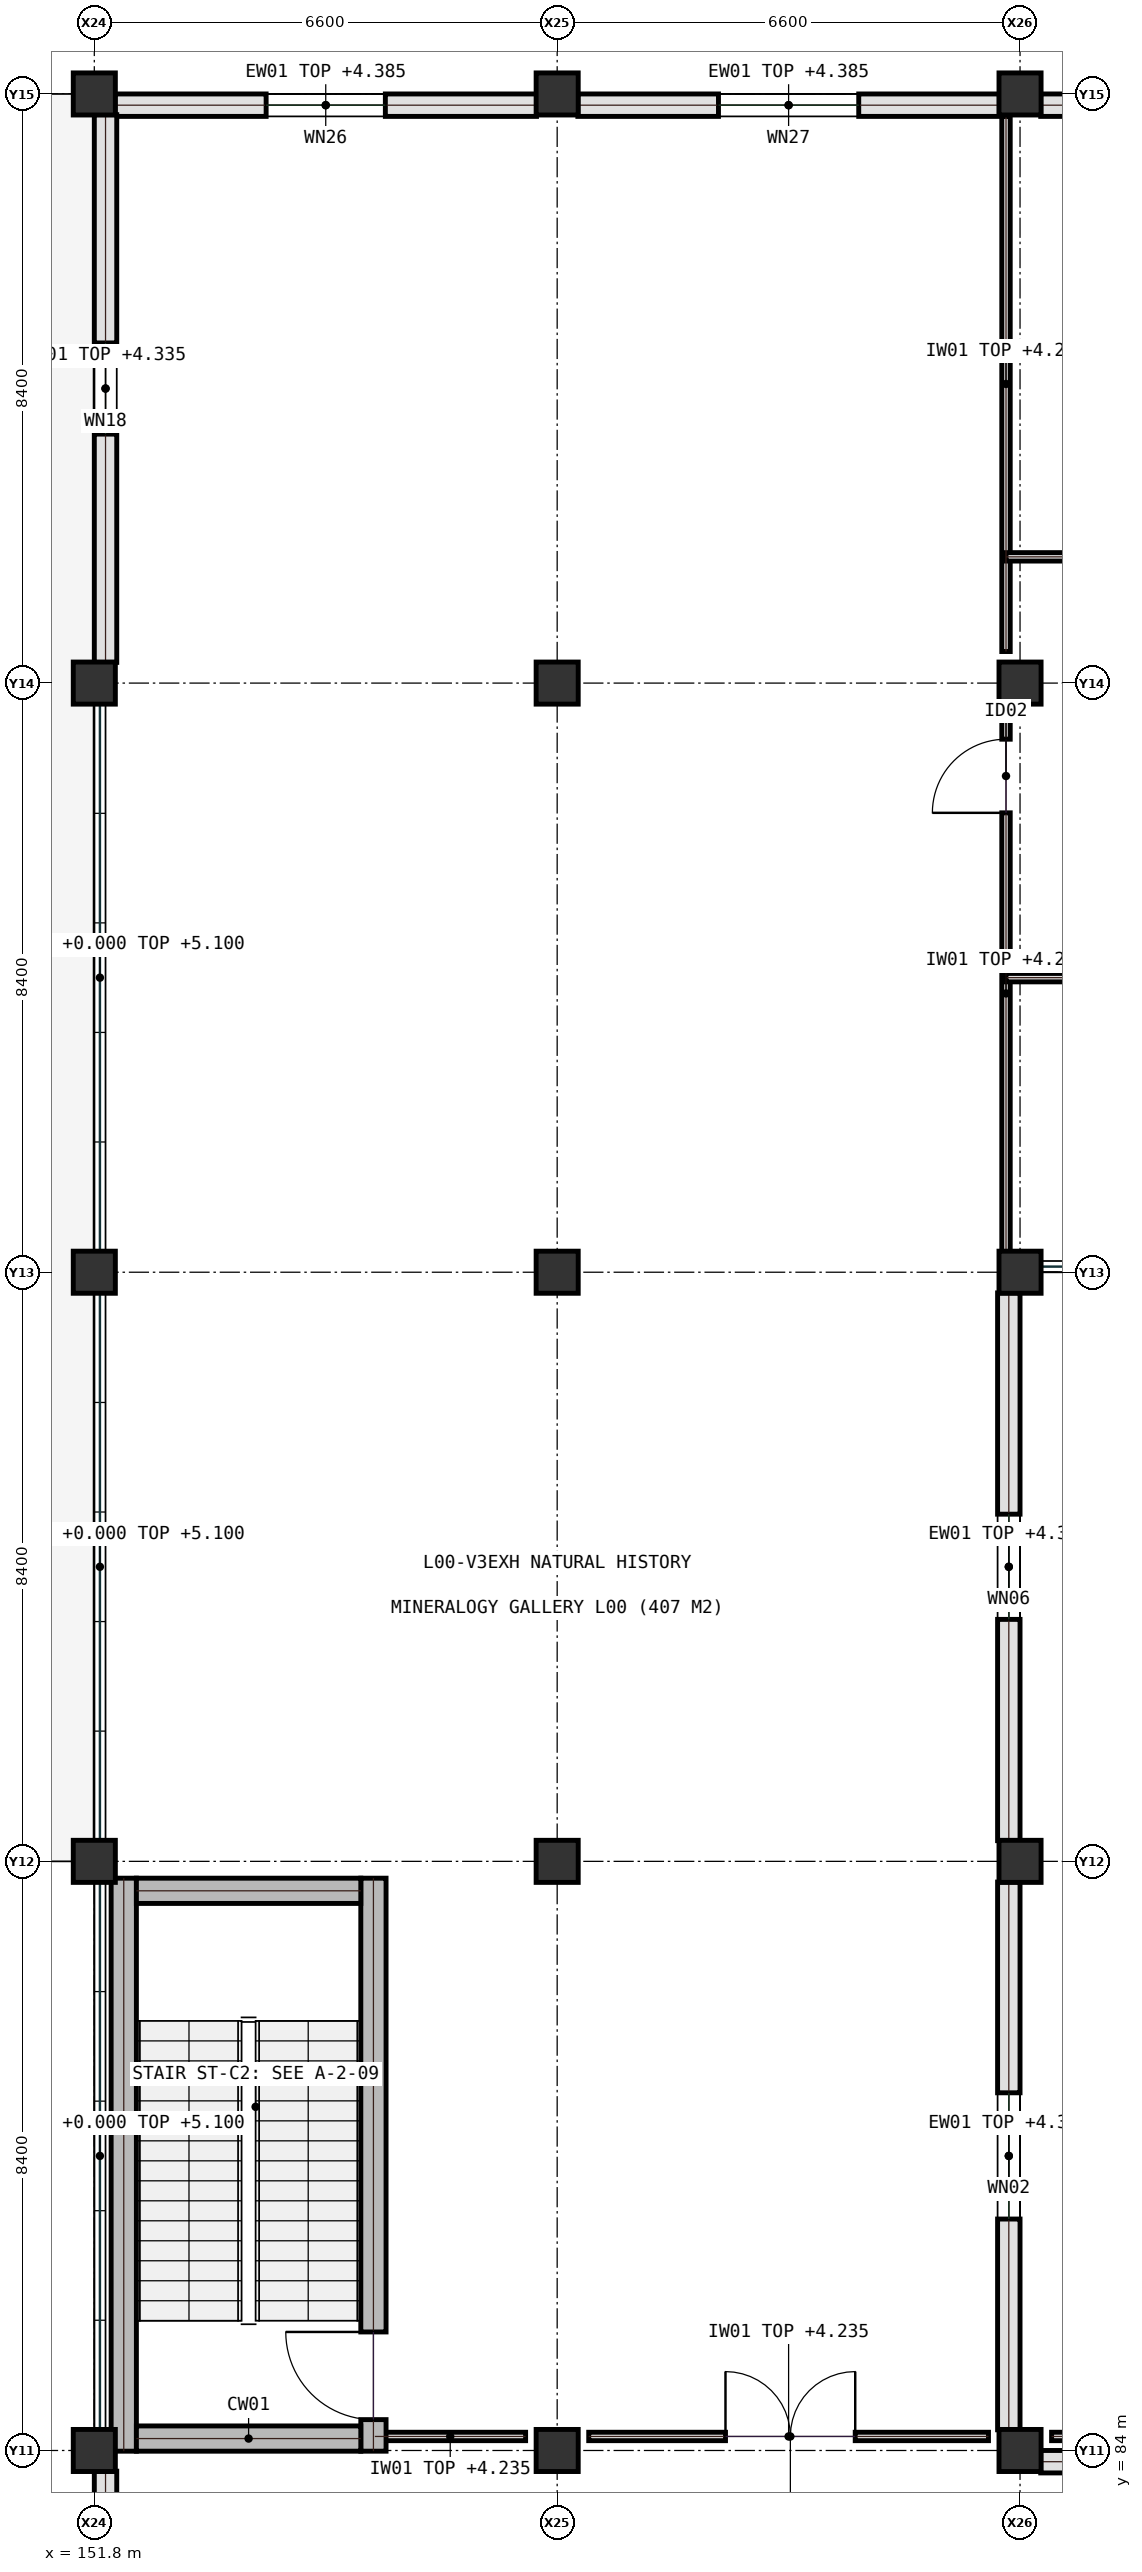
"""IFC4 building model, lengths in metres.
Left out: names, types, materials, properties, quantities, classifications, styles, units other than length and angle.
Written with IfcOpenShell. Run it as: python <this file> out.ifc"""

import sys

from ifc_helpers import new_model, si_unit, direction, frame, frame_2d, origin, origin_2d, place, context, subcontext, project, spatial, rectangle, extrude, element, fill, save


model = new_model("IFC4")
c1 = context("Model", 3, precision=1e-05, world=origin(), true_north=direction((0.0, 1.0)))
c2 = subcontext(c1, "Body", "Model", "MODEL_VIEW")
j1 = project(units=[si_unit("LENGTHUNIT", "METRE"), si_unit("PLANEANGLEUNIT", "RADIAN")], contexts=[c1])
p1 = place(None, origin())
s1 = spatial("IfcSite", under=j1, at=p1, CompositionType="ELEMENT")
p2 = place(p1, origin())
s2 = spatial("IfcBuilding", under=s1, at=p2, CompositionType="ELEMENT")
p3 = place(p2, origin())
s3 = spatial("IfcBuildingStorey", under=s2, at=p3, CompositionType="ELEMENT", Elevation=0.0)
for number, where, z_axis, x_axis in (
    (1, (151.8, 84.0, 0.0), (0.0, 0.0, 1.0), (1.0, 0.0, 0.0)),
    (2, (151.8, 92.4, 0.0), (0.0, 0.0, 1.0), (1.0, 0.0, 0.0)),
    (3, (151.8, 100.8, 0.0), (0.0, 0.0, 1.0), (1.0, 0.0, 0.0)),
    (4, (151.8, 109.2, 0.0), (0.0, 0.0, 1.0), (1.0, 0.0, 0.0)),
    (5, (151.8, 117.6, 0.0), (0.0, 0.0, 1.0), (1.0, 0.0, 0.0)),
    (6, (158.4, 84.0, 0.0), (0.0, 0.0, 1.0), (1.0, 0.0, 0.0)),
    (7, (158.4, 92.4, 0.0), (0.0, 0.0, 1.0), (1.0, 0.0, 0.0)),
    (8, (158.4, 100.8, 0.0), (0.0, 0.0, 1.0), (1.0, 0.0, 0.0)),
    (9, (158.4, 109.2, 0.0), (0.0, 0.0, 1.0), (1.0, 0.0, 0.0)),
    (10, (158.4, 117.6, 0.0), (0.0, 0.0, 1.0), (1.0, 0.0, 0.0)),
    (11, (165.0, 84.0, 0.0), (0.0, 0.0, 1.0), (1.0, 0.0, 0.0)),
    (12, (165.0, 92.4, 0.0), (0.0, 0.0, 1.0), (1.0, 0.0, 0.0)),
    (13, (165.0, 100.8, 0.0), (0.0, 0.0, 1.0), (1.0, 0.0, 0.0)),
    (14, (165.0, 109.2, 0.0), (0.0, 0.0, 1.0), (1.0, 0.0, 0.0)),
    (15, (165.0, 117.6, 0.0), (0.0, 0.0, 1.0), (1.0, 0.0, 0.0)),
):
    element("IfcColumn", number, at=place(p3, frame(where, z_axis=z_axis, x_axis=x_axis)), inside=s3, PredefinedType="COLUMN", context=c2, shape_type="SweptSolid", body=[
        extrude(rectangle(XDim=0.6, YDim=0.6, at=origin_2d()), origin(), (0.0, 0.0, 1.0), 5.4),
    ])
p4 = place(p3, frame((155.8, 84.2, 0.0), z_axis=(0.0, 0.0, 1.0), x_axis=(1.0, 0.0, 0.0)))
e16 = element("IfcWall", 16, at=p4, inside=s3, PredefinedType="PARTITIONING", context=c2, shape_type="SweptSolid", body=[
    extrude(rectangle(XDim=2.15, YDim=0.12, at=frame_2d((1.075, 0.0))), origin(), (0.0, 0.0, 1.0), 4.235),
])
p5 = place(p3, frame((158.85, 84.2, 0.0), z_axis=(0.0, 0.0, 1.0), x_axis=(1.0, 0.0, 0.0)))
e17 = element("IfcWall", 17, at=p5, inside=s3, PredefinedType="PARTITIONING", context=c2, shape_type="SweptSolid", body=[
    extrude(rectangle(XDim=5.7, YDim=0.12, at=frame_2d((2.85, 0.0))), origin(), (0.0, 0.0, 1.0), 4.235),
])
p6 = place(p5, frame((1.95, 0.0, 0.0)))
e18 = element("IfcOpeningElement", 18, at=p6, cuts=e17, PredefinedType="OPENING", context=c2, shape_type="SweptSolid", body=[
    extrude(rectangle(XDim=1.85, YDim=2.25, at=frame_2d((0.925, 1.125))), frame((0.0, 0.07, 0.0), z_axis=(0.0, -1.0, 0.0), x_axis=(1.0, 0.0, 0.0)), (0.0, 0.0, 1.0), 0.14),
])
p7 = place(p3, frame((165.45, 84.2, 0.0), z_axis=(0.0, 0.0, 1.0), x_axis=(1.0, 0.0, 0.0)))
e19 = element("IfcWall", 19, at=p7, inside=s3, PredefinedType="PARTITIONING", context=c2, shape_type="SweptSolid", body=[
    extrude(rectangle(XDim=5.7, YDim=0.12, at=frame_2d((2.85, 0.0))), origin(), (0.0, 0.0, 1.0), 4.25),
])
p8 = place(p3, frame((164.8, 100.8, 0.0), z_axis=(0.0, 0.0, 1.0), x_axis=(0.0, 1.0, 0.0)))
e20 = element("IfcWall", 20, at=p8, inside=s3, PredefinedType="PARTITIONING", context=c2, shape_type="SweptSolid", body=[
    extrude(rectangle(XDim=7.95, YDim=0.12, at=frame_2d((3.975, 0.0))), origin(), (0.0, 0.0, 1.0), 4.25),
])
p9 = place(p8, frame((6.55, 0.0, 0.0)))
e21 = element("IfcOpeningElement", 21, at=p9, cuts=e20, PredefinedType="OPENING", context=c2, shape_type="SweptSolid", body=[
    extrude(rectangle(XDim=1.05, YDim=2.15, at=frame_2d((0.525, 1.075))), frame((0.0, 0.07, 0.0), z_axis=(0.0, -1.0, 0.0), x_axis=(1.0, 0.0, 0.0)), (0.0, 0.0, 1.0), 0.14),
])
p10 = place(p3, frame((164.8, 109.65, 0.0), z_axis=(0.0, 0.0, 1.0), x_axis=(0.0, 1.0, 0.0)))
e22 = element("IfcWall", 22, at=p10, inside=s3, PredefinedType="PARTITIONING", context=c2, shape_type="SweptSolid", body=[
    extrude(rectangle(XDim=7.63, YDim=0.12, at=frame_2d((3.815, 0.0))), origin(), (0.0, 0.0, 1.0), 4.25),
])
p11 = place(p3, frame((164.8, 105.0, 0.0), z_axis=(0.0, 0.0, 1.0), x_axis=(1.0, 0.0, 0.0)))
e23 = element("IfcWall", 23, at=p11, inside=s3, PredefinedType="PARTITIONING", context=c2, shape_type="SweptSolid", body=[
    extrude(rectangle(XDim=13.2, YDim=0.12, at=frame_2d((6.6, 0.0))), origin(), (0.0, 0.0, 1.0), 4.25),
])
p12 = place(p11, frame((4.0, 0.0, 0.0)))
e24 = element("IfcOpeningElement", 24, at=p12, cuts=e23, PredefinedType="OPENING", context=c2, shape_type="SweptSolid", body=[
    extrude(rectangle(XDim=1.0, YDim=2.2, at=frame_2d((0.5, 1.1))), frame((0.0, 0.07, 0.0), z_axis=(0.0, -1.0, 0.0), x_axis=(1.0, 0.0, 0.0)), (0.0, 0.0, 1.0), 0.14),
])
p13 = place(p11, frame((9.0, 0.0, 0.0)))
e25 = element("IfcOpeningElement", 25, at=p13, cuts=e23, PredefinedType="OPENING", context=c2, shape_type="SweptSolid", body=[
    extrude(rectangle(XDim=1.0, YDim=2.2, at=frame_2d((0.5, 1.1))), frame((0.0, 0.07, 0.0), z_axis=(0.0, -1.0, 0.0), x_axis=(1.0, 0.0, 0.0)), (0.0, 0.0, 1.0), 0.14),
])
p14 = place(p3, frame((164.8, 111.0, 0.0), z_axis=(0.0, 0.0, 1.0), x_axis=(1.0, 0.0, 0.0)))
e26 = element("IfcWall", 26, at=p14, inside=s3, PredefinedType="PARTITIONING", context=c2, shape_type="SweptSolid", body=[
    extrude(rectangle(XDim=13.2, YDim=0.12, at=frame_2d((6.6, 0.0))), origin(), (0.0, 0.0, 1.0), 4.25),
])
p15 = place(p14, frame((4.0, 0.0, 0.0)))
e27 = element("IfcOpeningElement", 27, at=p15, cuts=e26, PredefinedType="OPENING", context=c2, shape_type="SweptSolid", body=[
    extrude(rectangle(XDim=1.15, YDim=2.2, at=frame_2d((0.575, 1.1))), frame((0.0, 0.07, 0.0), z_axis=(0.0, -1.0, 0.0), x_axis=(1.0, 0.0, 0.0)), (0.0, 0.0, 1.0), 0.14),
])
p16 = place(p14, frame((9.0, 0.0, 0.0)))
e28 = element("IfcOpeningElement", 28, at=p16, cuts=e26, PredefinedType="OPENING", context=c2, shape_type="SweptSolid", body=[
    extrude(rectangle(XDim=1.15, YDim=2.2, at=frame_2d((0.575, 1.1))), frame((0.0, 0.07, 0.0), z_axis=(0.0, -1.0, 0.0), x_axis=(1.0, 0.0, 0.0)), (0.0, 0.0, 1.0), 0.14),
])
p17 = place(p3, frame((151.96, 83.705, 0.0), z_axis=(0.0, 0.0, 1.0), x_axis=(0.0, -1.0, 0.0)))
e29 = element("IfcWall", 29, at=p17, inside=s3, PredefinedType="SOLIDWALL", context=c2, shape_type="SweptSolid", body=[
    extrude(rectangle(XDim=7.81, YDim=0.32, at=frame_2d((3.905, 0.0))), origin(), (0.0, 0.0, 1.0), 4.335),
])
p18 = place(p17, frame((3.18, 0.0, 0.95)))
e30 = element("IfcOpeningElement", 30, at=p18, cuts=e29, PredefinedType="OPENING", context=c2, shape_type="SweptSolid", body=[
    extrude(rectangle(XDim=1.45, YDim=1.6, at=frame_2d((0.725, 0.8))), frame((0.0, 0.17, 0.0), z_axis=(0.0, -1.0, 0.0), x_axis=(1.0, 0.0, 0.0)), (0.0, 0.0, 1.0), 0.34),
])
p19 = place(p3, frame((158.105, 117.44, 0.0), z_axis=(0.0, 0.0, 1.0), x_axis=(-1.0, 0.0, 0.0)))
e31 = element("IfcWall", 31, at=p19, inside=s3, PredefinedType="SOLIDWALL", context=c2, shape_type="SweptSolid", body=[
    extrude(rectangle(XDim=6.01, YDim=0.32, at=frame_2d((3.005, 0.0))), origin(), (0.0, 0.0, 1.0), 4.385),
])
p20 = place(p19, frame((2.155, 0.0, 0.95)))
e32 = element("IfcOpeningElement", 32, at=p20, cuts=e31, PredefinedType="OPENING", context=c2, shape_type="SweptSolid", body=[
    extrude(rectangle(XDim=1.7, YDim=1.95, at=frame_2d((0.85, 0.975))), frame((0.0, 0.17, 0.0), z_axis=(0.0, -1.0, 0.0), x_axis=(1.0, 0.0, 0.0)), (0.0, 0.0, 1.0), 0.34),
])
p21 = place(p3, frame((151.96, 117.305, 0.0), z_axis=(0.0, 0.0, 1.0), x_axis=(0.0, -1.0, 0.0)))
e33 = element("IfcWall", 33, at=p21, inside=s3, PredefinedType="SOLIDWALL", context=c2, shape_type="SweptSolid", body=[
    extrude(rectangle(XDim=7.81, YDim=0.32, at=frame_2d((3.905, 0.0))), origin(), (0.0, 0.0, 1.0), 4.335),
])
p22 = place(p21, frame((3.255, 0.0, 0.95)))
e34 = element("IfcOpeningElement", 34, at=p22, cuts=e33, PredefinedType="OPENING", context=c2, shape_type="SweptSolid", body=[
    extrude(rectangle(XDim=1.3, YDim=1.75, at=frame_2d((0.65, 0.875))), frame((0.0, 0.17, 0.0), z_axis=(0.0, -1.0, 0.0), x_axis=(1.0, 0.0, 0.0)), (0.0, 0.0, 1.0), 0.34),
])
p23 = place(p3, frame((164.84, 84.295, 0.0), z_axis=(0.0, 0.0, 1.0), x_axis=(0.0, 1.0, 0.0)))
e35 = element("IfcWall", 35, at=p23, inside=s3, PredefinedType="SOLIDWALL", context=c2, shape_type="SweptSolid", body=[
    extrude(rectangle(XDim=7.81, YDim=0.32, at=frame_2d((3.905, 0.0))), origin(), (0.0, 0.0, 1.0), 4.335),
])
p24 = place(p23, frame((3.005, 0.0, 0.95)))
e36 = element("IfcOpeningElement", 36, at=p24, cuts=e35, PredefinedType="OPENING", context=c2, shape_type="SweptSolid", body=[
    extrude(rectangle(XDim=1.8, YDim=1.6, at=frame_2d((0.9, 0.8))), frame((0.0, 0.17, 0.0), z_axis=(0.0, -1.0, 0.0), x_axis=(1.0, 0.0, 0.0)), (0.0, 0.0, 1.0), 0.34),
])
p25 = place(p3, frame((164.84, 92.695, 0.0), z_axis=(0.0, 0.0, 1.0), x_axis=(0.0, 1.0, 0.0)))
e37 = element("IfcWall", 37, at=p25, inside=s3, PredefinedType="SOLIDWALL", context=c2, shape_type="SweptSolid", body=[
    extrude(rectangle(XDim=7.81, YDim=0.32, at=frame_2d((3.905, 0.0))), origin(), (0.0, 0.0, 1.0), 4.335),
])
p26 = place(p25, frame((3.155, 0.0, 0.95)))
e38 = element("IfcOpeningElement", 38, at=p26, cuts=e37, PredefinedType="OPENING", context=c2, shape_type="SweptSolid", body=[
    extrude(rectangle(XDim=1.5, YDim=2.1, at=frame_2d((0.75, 1.05))), frame((0.0, 0.17, 0.0), z_axis=(0.0, -1.0, 0.0), x_axis=(1.0, 0.0, 0.0)), (0.0, 0.0, 1.0), 0.34),
])
p27 = place(p3, frame((164.705, 117.44, 0.0), z_axis=(0.0, 0.0, 1.0), x_axis=(-1.0, 0.0, 0.0)))
e39 = element("IfcWall", 39, at=p27, inside=s3, PredefinedType="SOLIDWALL", context=c2, shape_type="SweptSolid", body=[
    extrude(rectangle(XDim=6.01, YDim=0.32, at=frame_2d((3.005, 0.0))), origin(), (0.0, 0.0, 1.0), 4.385),
])
p28 = place(p27, frame((2.005, 0.0, 0.95)))
e40 = element("IfcOpeningElement", 40, at=p28, cuts=e39, PredefinedType="OPENING", context=c2, shape_type="SweptSolid", body=[
    extrude(rectangle(XDim=2.0, YDim=1.95, at=frame_2d((1.0, 0.975))), frame((0.0, 0.17, 0.0), z_axis=(0.0, -1.0, 0.0), x_axis=(1.0, 0.0, 0.0)), (0.0, 0.0, 1.0), 0.34),
])
p29 = place(p3, frame((171.305, 83.84, 0.0), z_axis=(0.0, 0.0, 1.0), x_axis=(-1.0, 0.0, 0.0)))
e41 = element("IfcWall", 41, at=p29, inside=s3, PredefinedType="SOLIDWALL", context=c2, shape_type="SweptSolid", body=[
    extrude(rectangle(XDim=6.01, YDim=0.32, at=frame_2d((3.005, 0.0))), origin(), (0.0, 0.0, 1.0), 4.385),
])
p30 = place(p29, frame((1.855, 0.0, 0.95)))
e42 = element("IfcOpeningElement", 42, at=p30, cuts=e41, PredefinedType="OPENING", context=c2, shape_type="SweptSolid", body=[
    extrude(rectangle(XDim=2.3, YDim=1.95, at=frame_2d((1.15, 0.975))), frame((0.0, 0.17, 0.0), z_axis=(0.0, -1.0, 0.0), x_axis=(1.0, 0.0, 0.0)), (0.0, 0.0, 1.0), 0.34),
])
p31 = place(p3, frame((171.305, 117.44, 0.0), z_axis=(0.0, 0.0, 1.0), x_axis=(-1.0, 0.0, 0.0)))
e43 = element("IfcWall", 43, at=p31, inside=s3, PredefinedType="SOLIDWALL", context=c2, shape_type="SweptSolid", body=[
    extrude(rectangle(XDim=6.01, YDim=0.32, at=frame_2d((3.005, 0.0))), origin(), (0.0, 0.0, 1.0), 4.385),
])
p32 = place(p31, frame((1.855, 0.0, 0.95)))
e44 = element("IfcOpeningElement", 44, at=p32, cuts=e43, PredefinedType="OPENING", context=c2, shape_type="SweptSolid", body=[
    extrude(rectangle(XDim=2.3, YDim=1.95, at=frame_2d((1.15, 0.975))), frame((0.0, 0.17, 0.0), z_axis=(0.0, -1.0, 0.0), x_axis=(1.0, 0.0, 0.0)), (0.0, 0.0, 1.0), 0.34),
])
p33 = place(p3, frame((152.22, 83.99, 0.0), z_axis=(0.0, 0.0, 1.0), x_axis=(0.0, 1.0, 0.0)))
e45 = element("IfcWall", 45, at=p33, inside=s3, PredefinedType="SHEAR", context=c2, shape_type="SweptSolid", body=[
    extrude(rectangle(XDim=8.17, YDim=0.36, at=frame_2d((4.085, 0.0))), origin(), (0.0, 0.0, 1.0), 5.1),
])
p34 = place(p3, frame((155.78, 83.99, 0.0), z_axis=(0.0, 0.0, 1.0), x_axis=(0.0, 1.0, 0.0)))
e46 = element("IfcWall", 46, at=p34, inside=s3, PredefinedType="SHEAR", context=c2, shape_type="SweptSolid", body=[
    extrude(rectangle(XDim=8.17, YDim=0.36, at=frame_2d((4.085, 0.0))), origin(), (0.0, 0.0, 1.0), 5.1),
])
p35 = place(p34, frame((0.45, 0.0, 0.0)))
e47 = element("IfcOpeningElement", 47, at=p35, cuts=e46, PredefinedType="OPENING", context=c2, shape_type="SweptSolid", body=[
    extrude(rectangle(XDim=1.25, YDim=2.15, at=frame_2d((0.625, 1.075))), frame((0.0, 0.19, 0.0), z_axis=(0.0, -1.0, 0.0), x_axis=(1.0, 0.0, 0.0)), (0.0, 0.0, 1.0), 0.38),
])
for number, where, z_axis, x_axis in (
    (48, (152.4, 91.98, 0.0), (0.0, 0.0, 1.0), (1.0, 0.0, 0.0)),
    (49, (152.4, 84.17, 0.0), (0.0, 0.0, 1.0), (1.0, 0.0, 0.0)),
):
    element("IfcWall", number, at=place(p3, frame(where, z_axis=z_axis, x_axis=x_axis)), inside=s3, PredefinedType="SHEAR", context=c2, shape_type="SweptSolid", body=[
        extrude(rectangle(XDim=3.2, YDim=0.36, at=frame_2d((1.6, 0.0))), origin(), (0.0, 0.0, 1.0), 5.1),
    ])
p36 = place(p6, origin())
e50 = element("IfcDoor", 50, at=p36, inside=s3, OperationType="DOUBLE_DOOR_SINGLE_SWING", PredefinedType="DOOR", context=c2, shape_type="SweptSolid", body=[
    extrude(rectangle(XDim=1.85, YDim=2.25, at=frame_2d((0.925, 1.125))), frame((0.0, 0.025, 0.0), z_axis=(0.0, -1.0, 0.0), x_axis=(1.0, 0.0, 0.0)), (0.0, 0.0, 1.0), 0.05),
])
fill(e18, e50)
p37 = place(p9, origin())
e51 = element("IfcDoor", 51, at=p37, inside=s3, OperationType="SINGLE_SWING_LEFT", PredefinedType="DOOR", context=c2, shape_type="SweptSolid", body=[
    extrude(rectangle(XDim=1.05, YDim=2.15, at=frame_2d((0.525, 1.075))), frame((0.0, 0.025, 0.0), z_axis=(0.0, -1.0, 0.0), x_axis=(1.0, 0.0, 0.0)), (0.0, 0.0, 1.0), 0.05),
])
fill(e21, e51)
p38 = place(p20, origin())
e52 = element("IfcWindow", 52, at=p38, inside=s3, PartitioningType="SINGLE_PANEL", PredefinedType="WINDOW", context=c2, shape_type="SweptSolid", body=[
    extrude(rectangle(XDim=1.7, YDim=1.95, at=frame_2d((0.85, 0.975))), frame((0.0, 0.03, 0.0), z_axis=(0.0, -1.0, 0.0), x_axis=(1.0, 0.0, 0.0)), (0.0, 0.0, 1.0), 0.06),
])
fill(e32, e52)
p39 = place(p22, origin())
e53 = element("IfcWindow", 53, at=p39, inside=s3, PartitioningType="SINGLE_PANEL", PredefinedType="WINDOW", context=c2, shape_type="SweptSolid", body=[
    extrude(rectangle(XDim=1.3, YDim=1.75, at=frame_2d((0.65, 0.875))), frame((0.0, 0.03, 0.0), z_axis=(0.0, -1.0, 0.0), x_axis=(1.0, 0.0, 0.0)), (0.0, 0.0, 1.0), 0.06),
])
fill(e34, e53)
p40 = place(p24, origin())
e54 = element("IfcWindow", 54, at=p40, inside=s3, PartitioningType="SINGLE_PANEL", PredefinedType="WINDOW", context=c2, shape_type="SweptSolid", body=[
    extrude(rectangle(XDim=1.8, YDim=1.6, at=frame_2d((0.9, 0.8))), frame((0.0, 0.03, 0.0), z_axis=(0.0, -1.0, 0.0), x_axis=(1.0, 0.0, 0.0)), (0.0, 0.0, 1.0), 0.06),
])
fill(e36, e54)
p41 = place(p26, origin())
e55 = element("IfcWindow", 55, at=p41, inside=s3, PartitioningType="SINGLE_PANEL", PredefinedType="WINDOW", context=c2, shape_type="SweptSolid", body=[
    extrude(rectangle(XDim=1.5, YDim=2.1, at=frame_2d((0.75, 1.05))), frame((0.0, 0.03, 0.0), z_axis=(0.0, -1.0, 0.0), x_axis=(1.0, 0.0, 0.0)), (0.0, 0.0, 1.0), 0.06),
])
fill(e38, e55)
p42 = place(p28, origin())
e56 = element("IfcWindow", 56, at=p42, inside=s3, PartitioningType="SINGLE_PANEL", PredefinedType="WINDOW", context=c2, shape_type="SweptSolid", body=[
    extrude(rectangle(XDim=2.0, YDim=1.95, at=frame_2d((1.0, 0.975))), frame((0.0, 0.03, 0.0), z_axis=(0.0, -1.0, 0.0), x_axis=(1.0, 0.0, 0.0)), (0.0, 0.0, 1.0), 0.06),
])
fill(e40, e56)
p43 = place(p35, origin())
e57 = element("IfcDoor", 57, at=p43, inside=s3, OperationType="SINGLE_SWING_RIGHT", PredefinedType="DOOR", context=c2, shape_type="SweptSolid", body=[
    extrude(rectangle(XDim=1.25, YDim=2.15, at=frame_2d((0.625, 1.075))), frame((0.0, 0.025, 0.0), z_axis=(0.0, -1.0, 0.0), x_axis=(1.0, 0.0, 0.0)), (0.0, 0.0, 1.0), 0.05),
])
fill(e47, e57)
save(model, sys.argv[1])
